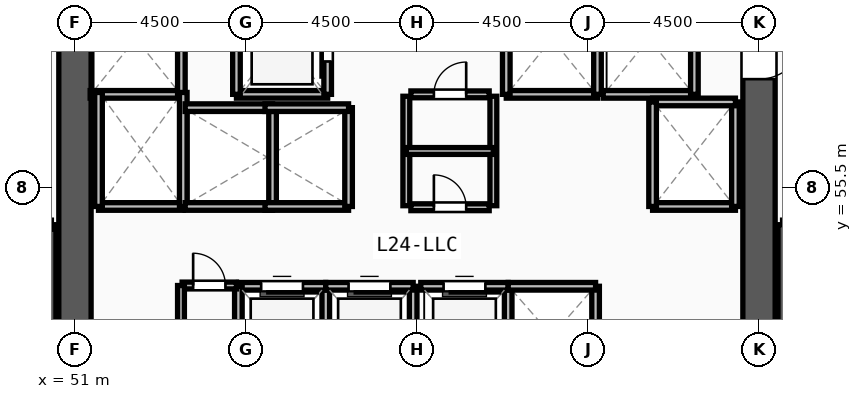
"""IFC4 building model, lengths in metres.
Left out: names, types, materials, properties, quantities, classifications, styles, units other than length and angle.
Written with IfcOpenShell. Run it as: python <this file> out.ifc"""

import sys

from ifc_helpers import new_model, si_unit, direction, frame, frame_2d, origin, place, context, subcontext, project, spatial, rectangle, extrude, source, transform, mapped, element, fill, save


model = new_model("IFC4")
c1 = context("Model", 3, precision=1e-05, world=origin(), true_north=direction((0.0, 1.0)))
c2 = subcontext(c1, "Body", "Model", "MODEL_VIEW")
j1 = project(units=[si_unit("LENGTHUNIT", "METRE"), si_unit("PLANEANGLEUNIT", "RADIAN")], contexts=[c1])
p1 = place(None, origin())
s1 = spatial("IfcSite", under=j1, at=p1, CompositionType="ELEMENT")
p2 = place(p1, origin())
s2 = spatial("IfcBuilding", under=s1, at=p2, CompositionType="ELEMENT")
p3 = place(p2, frame((0.0, 0.0, 93.0)))
s3 = spatial("IfcBuildingStorey", under=s2, at=p3, CompositionType="ELEMENT", Elevation=93.0)
p4 = place(p3, frame((69.0, 60.675, 0.0), z_axis=(0.0, 0.0, 1.0), x_axis=(0.0, -1.0, 0.0)))
e1 = element("IfcWall", 1, at=p4, inside=s3, PredefinedType="SHEAR", context=c2, shape_type="SweptSolid", body=[
    extrude(rectangle(XDim=13.35, YDim=0.85, at=frame_2d((6.675, 0.0))), origin(), (0.0, 0.0, 1.0), 4.22),
])
m1 = source(origin(), c2, "Body", "SweptSolid", [
    extrude(rectangle(XDim=1.2, YDim=2.2, at=frame_2d((0.6, 1.1))), frame((0.0, 0.435, 0.0), z_axis=(0.0, -1.0, 0.0), x_axis=(1.0, 0.0, 0.0)), (0.0, 0.0, 1.0), 0.87),
])
p5 = place(p4, frame((1.125, 0.0, 0.0)))
e2 = element("IfcOpeningElement", 2, at=p5, cuts=e1, PredefinedType="OPENING", context=c2, shape_type="MappedRepresentation", body=[
    mapped(m1, transform((0.0, 0.0, 0.0), x_axis=(1.0, 0.0, 0.0), y_axis=(0.0, 1.0, 0.0), z_axis=(0.0, 0.0, 1.0), scale=1.0)),
])
p6 = place(p3, frame((51.0, 47.325, 0.0), z_axis=(0.0, 0.0, 1.0), x_axis=(0.0, 1.0, 0.0)))
e3 = element("IfcWall", 3, at=p6, inside=s3, PredefinedType="SHEAR", context=c2, shape_type="SweptSolid", body=[
    extrude(rectangle(XDim=13.35, YDim=0.85, at=frame_2d((6.675, 0.0))), origin(), (0.0, 0.0, 1.0), 4.22),
])
for number, where, z_axis, x_axis in (
    (4, (50.38, 46.7, 0.0), (0.0, 0.0, 1.0), (0.0, 1.0, 0.0)),
    (5, (69.62, 54.52, 0.0), (0.0, 0.0, 1.0), (0.0, -1.0, 0.0)),
):
    element("IfcWall", number, at=place(p3, frame(where, z_axis=z_axis, x_axis=x_axis)), inside=s3, PredefinedType="SOLIDWALL", context=c2, shape_type="SweptSolid", body=[
        extrude(rectangle(XDim=7.82, YDim=0.24, at=frame_2d((3.91, 0.0))), origin(), (0.0, 0.0, 1.0), 4.22),
    ])
p7 = place(p3, frame((55.25, 57.95, 0.0), z_axis=(0.0, 0.0, 1.0), x_axis=(1.0, 0.0, 0.0)))
e6 = element("IfcWall", 6, at=p7, inside=s3, PredefinedType="SOLIDWALL", context=c2, shape_type="SweptSolid", body=[
    extrude(rectangle(XDim=2.4, YDim=0.2, at=frame_2d((1.2, 0.0))), origin(), (0.0, 0.0, 1.0), 4.22),
])
p8 = place(p3, frame((57.65, 57.95, 0.0), z_axis=(0.0, 0.0, 1.0), x_axis=(0.0, 1.0, 0.0)))
e7 = element("IfcWall", 7, at=p8, inside=s3, PredefinedType="SOLIDWALL", context=c2, shape_type="SweptSolid", body=[
    extrude(rectangle(XDim=2.93, YDim=0.2, at=frame_2d((1.465, 0.0))), origin(), (0.0, 0.0, 1.0), 4.22),
])
m2 = source(origin(), c2, "Body", "SweptSolid", [
    extrude(rectangle(XDim=1.2, YDim=2.3, at=frame_2d((0.6, 1.15))), frame((0.0, 0.11, 0.0), z_axis=(0.0, -1.0, 0.0), x_axis=(1.0, 0.0, 0.0)), (0.0, 0.0, 1.0), 0.22),
])
p9 = place(p8, frame((0.865, 0.0, 0.0)))
e8 = element("IfcOpeningElement", 8, at=p9, cuts=e7, PredefinedType="OPENING", context=c2, shape_type="MappedRepresentation", body=[
    mapped(m2, transform((0.0, 0.0, 0.0), x_axis=(1.0, 0.0, 0.0), y_axis=(0.0, 1.0, 0.0), z_axis=(0.0, 0.0, 1.0), scale=1.0)),
])
p10 = place(p3, frame((55.25, 60.88, 0.0), z_axis=(0.0, 0.0, 1.0), x_axis=(0.0, -1.0, 0.0)))
e9 = element("IfcWall", 9, at=p10, inside=s3, PredefinedType="SOLIDWALL", context=c2, shape_type="SweptSolid", body=[
    extrude(rectangle(XDim=2.93, YDim=0.2, at=frame_2d((1.465, 0.0))), origin(), (0.0, 0.0, 1.0), 4.22),
])
p11 = place(p3, frame((62.35, 57.95, 0.0), z_axis=(0.0, 0.0, 1.0), x_axis=(1.0, 0.0, 0.0)))
e10 = element("IfcWall", 10, at=p11, inside=s3, PredefinedType="SOLIDWALL", context=c2, shape_type="SweptSolid", body=[
    extrude(rectangle(XDim=2.4, YDim=0.2, at=frame_2d((1.2, 0.0))), origin(), (0.0, 0.0, 1.0), 4.22),
])
for number, where, z_axis, x_axis in (
    (11, (64.75, 57.95, 0.0), (0.0, 0.0, 1.0), (0.0, 1.0, 0.0)),
    (12, (62.35, 60.88, 0.0), (0.0, 0.0, 1.0), (0.0, -1.0, 0.0)),
):
    element("IfcWall", number, at=place(p3, frame(where, z_axis=z_axis, x_axis=x_axis)), inside=s3, PredefinedType="SOLIDWALL", context=c2, shape_type="SweptSolid", body=[
        extrude(rectangle(XDim=2.93, YDim=0.2, at=frame_2d((1.465, 0.0))), origin(), (0.0, 0.0, 1.0), 4.22),
    ])
p12 = place(p3, frame((64.9, 57.95, 0.0), z_axis=(0.0, 0.0, 1.0), x_axis=(1.0, 0.0, 0.0)))
e13 = element("IfcWall", 13, at=p12, inside=s3, PredefinedType="SOLIDWALL", context=c2, shape_type="SweptSolid", body=[
    extrude(rectangle(XDim=2.4, YDim=0.2, at=frame_2d((1.2, 0.0))), origin(), (0.0, 0.0, 1.0), 4.22),
])
p13 = place(p3, frame((67.3, 57.95, 0.0), z_axis=(0.0, 0.0, 1.0), x_axis=(0.0, 1.0, 0.0)))
e14 = element("IfcWall", 14, at=p13, inside=s3, PredefinedType="SOLIDWALL", context=c2, shape_type="SweptSolid", body=[
    extrude(rectangle(XDim=2.93, YDim=0.2, at=frame_2d((1.465, 0.0))), origin(), (0.0, 0.0, 1.0), 4.22),
])
p14 = place(p3, frame((51.4, 57.95, 0.0), z_axis=(0.0, 0.0, 1.0), x_axis=(1.0, 0.0, 0.0)))
e15 = element("IfcWall", 15, at=p14, inside=s3, PredefinedType="SOLIDWALL", context=c2, shape_type="SweptSolid", body=[
    extrude(rectangle(XDim=2.4, YDim=0.2, at=frame_2d((1.2, 0.0))), origin(), (0.0, 0.0, 1.0), 4.22),
])
p15 = place(p3, frame((53.8, 57.95, 0.0), z_axis=(0.0, 0.0, 1.0), x_axis=(0.0, 1.0, 0.0)))
e16 = element("IfcWall", 16, at=p15, inside=s3, PredefinedType="SOLIDWALL", context=c2, shape_type="SweptSolid", body=[
    extrude(rectangle(XDim=2.93, YDim=0.2, at=frame_2d((1.465, 0.0))), origin(), (0.0, 0.0, 1.0), 4.22),
])
p16 = place(p3, frame((51.62, 55.0, 0.0), z_axis=(0.0, 0.0, 1.0), x_axis=(1.0, 0.0, 0.0)))
e17 = element("IfcWall", 17, at=p16, inside=s3, PredefinedType="SOLIDWALL", context=c2, shape_type="SweptSolid", body=[
    extrude(rectangle(XDim=2.23, YDim=0.2, at=frame_2d((1.115, 0.0))), origin(), (0.0, 0.0, 1.0), 4.22),
])
for number, where, z_axis, x_axis in (
    (18, (53.85, 55.0, 0.0), (0.0, 0.0, 1.0), (0.0, 1.0, 0.0)),
    (19, (51.62, 58.0, 0.0), (0.0, 0.0, 1.0), (0.0, -1.0, 0.0)),
):
    element("IfcWall", number, at=place(p3, frame(where, z_axis=z_axis, x_axis=x_axis)), inside=s3, PredefinedType="SOLIDWALL", context=c2, shape_type="SweptSolid", body=[
        extrude(rectangle(XDim=3.0, YDim=0.2, at=frame_2d((1.5, 0.0))), origin(), (0.0, 0.0, 1.0), 4.22),
    ])
p17 = place(p3, frame((66.2, 55.0, 0.0), z_axis=(0.0, 0.0, 1.0), x_axis=(1.0, 0.0, 0.0)))
e20 = element("IfcWall", 20, at=p17, inside=s3, PredefinedType="SOLIDWALL", context=c2, shape_type="SweptSolid", body=[
    extrude(rectangle(XDim=2.18, YDim=0.2, at=frame_2d((1.09, 0.0))), origin(), (0.0, 0.0, 1.0), 4.22),
])
p18 = place(p3, frame((68.38, 55.0, 0.0), z_axis=(0.0, 0.0, 1.0), x_axis=(0.0, 1.0, 0.0)))
e21 = element("IfcWall", 21, at=p18, inside=s3, PredefinedType="SOLIDWALL", context=c2, shape_type="SweptSolid", body=[
    extrude(rectangle(XDim=2.75, YDim=0.2, at=frame_2d((1.375, 0.0))), origin(), (0.0, 0.0, 1.0), 4.22),
])
p19 = place(p3, frame((68.38, 57.75, 0.0), z_axis=(0.0, 0.0, 1.0), x_axis=(-1.0, 0.0, 0.0)))
e22 = element("IfcWall", 22, at=p19, inside=s3, PredefinedType="SOLIDWALL", context=c2, shape_type="SweptSolid", body=[
    extrude(rectangle(XDim=2.18, YDim=0.2, at=frame_2d((1.09, 0.0))), origin(), (0.0, 0.0, 1.0), 4.22),
])
p20 = place(p3, frame((66.2, 57.75, 0.0), z_axis=(0.0, 0.0, 1.0), x_axis=(0.0, -1.0, 0.0)))
e23 = element("IfcWall", 23, at=p20, inside=s3, PredefinedType="SOLIDWALL", context=c2, shape_type="SweptSolid", body=[
    extrude(rectangle(XDim=2.75, YDim=0.2, at=frame_2d((1.375, 0.0))), origin(), (0.0, 0.0, 1.0), 4.22),
])
p21 = place(p3, frame((57.6, 50.3, 0.0), z_axis=(0.0, 0.0, 1.0), x_axis=(0.0, 1.0, 0.0)))
e24 = element("IfcWall", 24, at=p21, inside=s3, PredefinedType="SOLIDWALL", context=c2, shape_type="SweptSolid", body=[
    extrude(rectangle(XDim=2.6, YDim=0.2, at=frame_2d((1.3, 0.0))), origin(), (0.0, 0.0, 1.0), 4.22),
])
p22 = place(p3, frame((57.6, 52.9, 0.0), z_axis=(0.0, 0.0, 1.0), x_axis=(-1.0, 0.0, 0.0)))
e25 = element("IfcWall", 25, at=p22, inside=s3, PredefinedType="SOLIDWALL", context=c2, shape_type="SweptSolid", body=[
    extrude(rectangle(XDim=2.3, YDim=0.2, at=frame_2d((1.15, 0.0))), origin(), (0.0, 0.0, 1.0), 4.22),
])
m3 = source(origin(), c2, "Body", "SweptSolid", [
    extrude(rectangle(XDim=1.1, YDim=2.2, at=frame_2d((0.55, 1.1))), frame((0.0, 0.11, 0.0), z_axis=(0.0, -1.0, 0.0), x_axis=(1.0, 0.0, 0.0)), (0.0, 0.0, 1.0), 0.22),
])
p23 = place(p22, frame((0.6, 0.0, 0.0)))
e26 = element("IfcOpeningElement", 26, at=p23, cuts=e25, PredefinedType="OPENING", context=c2, shape_type="MappedRepresentation", body=[
    mapped(m3, transform((0.0, 0.0, 0.0), x_axis=(1.0, 0.0, 0.0), y_axis=(0.0, 1.0, 0.0), z_axis=(0.0, 0.0, 1.0), scale=1.0)),
])
for number, where, z_axis, x_axis in (
    (27, (55.3, 52.9, 0.0), (0.0, 0.0, 1.0), (0.0, -1.0, 0.0)),
    (28, (59.9, 50.3, 0.0), (0.0, 0.0, 1.0), (0.0, 1.0, 0.0)),
):
    element("IfcWall", number, at=place(p3, frame(where, z_axis=z_axis, x_axis=x_axis)), inside=s3, PredefinedType="SOLIDWALL", context=c2, shape_type="SweptSolid", body=[
        extrude(rectangle(XDim=2.6, YDim=0.2, at=frame_2d((1.3, 0.0))), origin(), (0.0, 0.0, 1.0), 4.22),
    ])
p24 = place(p3, frame((59.9, 52.9, 0.0), z_axis=(0.0, 0.0, 1.0), x_axis=(-1.0, 0.0, 0.0)))
e29 = element("IfcWall", 29, at=p24, inside=s3, PredefinedType="SOLIDWALL", context=c2, shape_type="SweptSolid", body=[
    extrude(rectangle(XDim=2.3, YDim=0.2, at=frame_2d((1.15, 0.0))), origin(), (0.0, 0.0, 1.0), 4.22),
])
p25 = place(p24, frame((0.6, 0.0, 0.0)))
e30 = element("IfcOpeningElement", 30, at=p25, cuts=e29, PredefinedType="OPENING", context=c2, shape_type="MappedRepresentation", body=[
    mapped(m3, transform((0.0, 0.0, 0.0), x_axis=(1.0, 0.0, 0.0), y_axis=(0.0, 1.0, 0.0), z_axis=(0.0, 0.0, 1.0), scale=1.0)),
])
p26 = place(p3, frame((62.4, 50.3, 0.0), z_axis=(0.0, 0.0, 1.0), x_axis=(0.0, 1.0, 0.0)))
e31 = element("IfcWall", 31, at=p26, inside=s3, PredefinedType="SOLIDWALL", context=c2, shape_type="SweptSolid", body=[
    extrude(rectangle(XDim=2.6, YDim=0.2, at=frame_2d((1.3, 0.0))), origin(), (0.0, 0.0, 1.0), 4.22),
])
p27 = place(p3, frame((62.4, 52.9, 0.0), z_axis=(0.0, 0.0, 1.0), x_axis=(-1.0, 0.0, 0.0)))
e32 = element("IfcWall", 32, at=p27, inside=s3, PredefinedType="SOLIDWALL", context=c2, shape_type="SweptSolid", body=[
    extrude(rectangle(XDim=2.3, YDim=0.2, at=frame_2d((1.15, 0.0))), origin(), (0.0, 0.0, 1.0), 4.22),
])
p28 = place(p27, frame((0.6, 0.0, 0.0)))
e33 = element("IfcOpeningElement", 33, at=p28, cuts=e32, PredefinedType="OPENING", context=c2, shape_type="MappedRepresentation", body=[
    mapped(m3, transform((0.0, 0.0, 0.0), x_axis=(1.0, 0.0, 0.0), y_axis=(0.0, 1.0, 0.0), z_axis=(0.0, 0.0, 1.0), scale=1.0)),
])
p29 = place(p3, frame((64.7, 50.3, 0.0), z_axis=(0.0, 0.0, 1.0), x_axis=(0.0, 1.0, 0.0)))
e34 = element("IfcWall", 34, at=p29, inside=s3, PredefinedType="SOLIDWALL", context=c2, shape_type="SweptSolid", body=[
    extrude(rectangle(XDim=2.6, YDim=0.2, at=frame_2d((1.3, 0.0))), origin(), (0.0, 0.0, 1.0), 4.22),
])
for number, where, z_axis, x_axis in (
    (35, (64.7, 52.9, 0.0), (0.0, 0.0, 1.0), (-1.0, 0.0, 0.0)),
    (36, (53.9, 55.0, 0.0), (0.0, 0.0, 1.0), (1.0, 0.0, 0.0)),
):
    element("IfcWall", number, at=place(p3, frame(where, z_axis=z_axis, x_axis=x_axis)), inside=s3, PredefinedType="SOLIDWALL", context=c2, shape_type="SweptSolid", body=[
        extrude(rectangle(XDim=2.3, YDim=0.2, at=frame_2d((1.15, 0.0))), origin(), (0.0, 0.0, 1.0), 4.22),
    ])
p30 = place(p3, frame((56.2, 55.0, 0.0), z_axis=(0.0, 0.0, 1.0), x_axis=(0.0, 1.0, 0.0)))
e37 = element("IfcWall", 37, at=p30, inside=s3, PredefinedType="SOLIDWALL", context=c2, shape_type="SweptSolid", body=[
    extrude(rectangle(XDim=2.6, YDim=0.2, at=frame_2d((1.3, 0.0))), origin(), (0.0, 0.0, 1.0), 4.22),
])
p31 = place(p3, frame((56.2, 57.6, 0.0), z_axis=(0.0, 0.0, 1.0), x_axis=(-1.0, 0.0, 0.0)))
e38 = element("IfcWall", 38, at=p31, inside=s3, PredefinedType="SOLIDWALL", context=c2, shape_type="SweptSolid", body=[
    extrude(rectangle(XDim=2.3, YDim=0.2, at=frame_2d((1.15, 0.0))), origin(), (0.0, 0.0, 1.0), 4.22),
])
p32 = place(p3, frame((56.0, 55.0, 0.0), z_axis=(0.0, 0.0, 1.0), x_axis=(1.0, 0.0, 0.0)))
e39 = element("IfcWall", 39, at=p32, inside=s3, PredefinedType="SOLIDWALL", context=c2, shape_type="SweptSolid", body=[
    extrude(rectangle(XDim=2.2, YDim=0.2, at=frame_2d((1.1, 0.0))), origin(), (0.0, 0.0, 1.0), 4.22),
])
p33 = place(p3, frame((58.2, 55.0, 0.0), z_axis=(0.0, 0.0, 1.0), x_axis=(0.0, 1.0, 0.0)))
e40 = element("IfcWall", 40, at=p33, inside=s3, PredefinedType="SOLIDWALL", context=c2, shape_type="SweptSolid", body=[
    extrude(rectangle(XDim=2.6, YDim=0.2, at=frame_2d((1.3, 0.0))), origin(), (0.0, 0.0, 1.0), 4.22),
])
p34 = place(p3, frame((58.2, 57.6, 0.0), z_axis=(0.0, 0.0, 1.0), x_axis=(-1.0, 0.0, 0.0)))
e41 = element("IfcWall", 41, at=p34, inside=s3, PredefinedType="SOLIDWALL", context=c2, shape_type="SweptSolid", body=[
    extrude(rectangle(XDim=2.2, YDim=0.2, at=frame_2d((1.1, 0.0))), origin(), (0.0, 0.0, 1.0), 4.22),
])
p35 = place(p3, frame((59.84, 54.98, 0.0), z_axis=(0.0, 0.0, 1.0), x_axis=(1.0, 0.0, 0.0)))
e42 = element("IfcWall", 42, at=p35, inside=s3, PredefinedType="PARTITIONING", context=c2, shape_type="SweptSolid", body=[
    extrude(rectangle(XDim=2.06, YDim=0.18, at=frame_2d((1.03, 0.0))), origin(), (0.0, 0.0, 1.0), 4.22),
])
m4 = source(origin(), c2, "Body", "SweptSolid", [
    extrude(rectangle(XDim=0.85, YDim=2.1, at=frame_2d((0.425, 1.05))), frame((0.0, 0.1, 0.0), z_axis=(0.0, -1.0, 0.0), x_axis=(1.0, 0.0, 0.0)), (0.0, 0.0, 1.0), 0.2),
])
p36 = place(p35, frame((0.605, 0.0, 0.0)))
e43 = element("IfcOpeningElement", 43, at=p36, cuts=e42, PredefinedType="OPENING", context=c2, shape_type="MappedRepresentation", body=[
    mapped(m4, transform((0.0, 0.0, 0.0), x_axis=(1.0, 0.0, 0.0), y_axis=(0.0, 1.0, 0.0), z_axis=(0.0, 0.0, 1.0), scale=1.0)),
])
p37 = place(p3, frame((59.84, 57.95, 0.0), z_axis=(0.0, 0.0, 1.0), x_axis=(1.0, 0.0, 0.0)))
e44 = element("IfcWall", 44, at=p37, inside=s3, PredefinedType="PARTITIONING", context=c2, shape_type="SweptSolid", body=[
    extrude(rectangle(XDim=2.06, YDim=0.18, at=frame_2d((1.03, 0.0))), origin(), (0.0, 0.0, 1.0), 4.22),
])
p38 = place(p37, frame((0.605, 0.0, 0.0)))
e45 = element("IfcOpeningElement", 45, at=p38, cuts=e44, PredefinedType="OPENING", context=c2, shape_type="MappedRepresentation", body=[
    mapped(m4, transform((0.0, 0.0, 0.0), x_axis=(1.0, 0.0, 0.0), y_axis=(0.0, 1.0, 0.0), z_axis=(0.0, 0.0, 1.0), scale=1.0)),
])
p39 = place(p3, frame((53.82, 52.92, 0.0), z_axis=(0.0, 0.0, 1.0), x_axis=(1.0, 0.0, 0.0)))
e46 = element("IfcWall", 46, at=p39, inside=s3, PredefinedType="PARTITIONING", context=c2, shape_type="SweptSolid", body=[
    extrude(rectangle(XDim=1.43, YDim=0.18, at=frame_2d((0.715, 0.0))), origin(), (0.0, 0.0, 1.0), 4.22),
])
p40 = place(p39, frame((0.29, 0.0, 0.0)))
e47 = element("IfcOpeningElement", 47, at=p40, cuts=e46, PredefinedType="OPENING", context=c2, shape_type="MappedRepresentation", body=[
    mapped(m4, transform((0.0, 0.0, 0.0), x_axis=(1.0, 0.0, 0.0), y_axis=(0.0, 1.0, 0.0), z_axis=(0.0, 0.0, 1.0), scale=1.0)),
])
for number, where, z_axis, x_axis in (
    (48, (59.72, 55.02, 0.0), (0.0, 0.0, 1.0), (0.0, 1.0, 0.0)),
    (49, (62.01, 55.02, 0.0), (0.0, 0.0, 1.0), (0.0, 1.0, 0.0)),
):
    element("IfcWall", number, at=place(p3, frame(where, z_axis=z_axis, x_axis=x_axis)), inside=s3, PredefinedType="PARTITIONING", context=c2, shape_type="SweptSolid", body=[
        extrude(rectangle(XDim=2.88, YDim=0.18, at=frame_2d((1.44, 0.0))), origin(), (0.0, 0.0, 1.0), 4.22),
    ])
p41 = place(p3, frame((59.72, 56.46, 0.0), z_axis=(0.0, 0.0, 1.0), x_axis=(1.0, 0.0, 0.0)))
e50 = element("IfcWall", 50, at=p41, inside=s3, PredefinedType="PARTITIONING", context=c2, shape_type="SweptSolid", body=[
    extrude(rectangle(XDim=2.29, YDim=0.18, at=frame_2d((1.145, 0.0))), origin(), (0.0, 0.0, 1.0), 4.22),
])
p42 = place(p3, frame((53.79, 50.35, 0.0), z_axis=(0.0, 0.0, 1.0), x_axis=(0.0, 1.0, 0.0)))
e51 = element("IfcWall", 51, at=p42, inside=s3, PredefinedType="PARTITIONING", context=c2, shape_type="SweptSolid", body=[
    extrude(rectangle(XDim=2.57, YDim=0.18, at=frame_2d((1.285, 0.0))), origin(), (0.0, 0.0, 1.0), 4.22),
])
m5 = source(origin(), c2, "Body", "SweptSolid", [
    extrude(rectangle(XDim=1.2, YDim=2.2, at=frame_2d((0.6, 1.1))), frame((0.0, 0.025, 0.0), z_axis=(0.0, -1.0, 0.0), x_axis=(1.0, 0.0, 0.0)), (0.0, 0.0, 1.0), 0.05),
])
p43 = place(p5, origin())
e52 = element("IfcDoor", 52, at=p43, inside=s3, OperationType="SINGLE_SWING_LEFT", PredefinedType="DOOR", context=c2, shape_type="MappedRepresentation", body=[
    mapped(m5, transform((0.0, 0.0, 0.0), x_axis=(1.0, 0.0, 0.0), y_axis=(0.0, 1.0, 0.0), z_axis=(0.0, 0.0, 1.0), scale=1.0)),
])
fill(e2, e52)
m6 = source(origin(), c2, "Body", "SweptSolid", [
    extrude(rectangle(XDim=1.2, YDim=2.3, at=frame_2d((0.6, 1.15))), frame((0.0, 0.025, 0.0), z_axis=(0.0, -1.0, 0.0), x_axis=(1.0, 0.0, 0.0)), (0.0, 0.0, 1.0), 0.05),
])
p44 = place(p9, origin())
e53 = element("IfcDoor", 53, at=p44, inside=s3, OperationType="SLIDING_TO_LEFT", PredefinedType="DOOR", context=c2, shape_type="MappedRepresentation", body=[
    mapped(m6, transform((0.0, 0.0, 0.0), x_axis=(1.0, 0.0, 0.0), y_axis=(0.0, 1.0, 0.0), z_axis=(0.0, 0.0, 1.0), scale=1.0)),
])
fill(e8, e53)
m7 = source(origin(), c2, "Body", "SweptSolid", [
    extrude(rectangle(XDim=1.1, YDim=2.2, at=frame_2d((0.55, 1.1))), frame((0.0, 0.025, 0.0), z_axis=(0.0, -1.0, 0.0), x_axis=(1.0, 0.0, 0.0)), (0.0, 0.0, 1.0), 0.05),
])
p45 = place(p23, origin())
e54 = element("IfcDoor", 54, at=p45, inside=s3, OperationType="SLIDING_TO_LEFT", PredefinedType="DOOR", context=c2, shape_type="MappedRepresentation", body=[
    mapped(m7, transform((0.0, 0.0, 0.0), x_axis=(1.0, 0.0, 0.0), y_axis=(0.0, 1.0, 0.0), z_axis=(0.0, 0.0, 1.0), scale=1.0)),
])
fill(e26, e54)
p46 = place(p25, origin())
e55 = element("IfcDoor", 55, at=p46, inside=s3, OperationType="SLIDING_TO_LEFT", PredefinedType="DOOR", context=c2, shape_type="MappedRepresentation", body=[
    mapped(m7, transform((0.0, 0.0, 0.0), x_axis=(1.0, 0.0, 0.0), y_axis=(0.0, 1.0, 0.0), z_axis=(0.0, 0.0, 1.0), scale=1.0)),
])
fill(e30, e55)
p47 = place(p28, origin())
e56 = element("IfcDoor", 56, at=p47, inside=s3, OperationType="SLIDING_TO_LEFT", PredefinedType="DOOR", context=c2, shape_type="MappedRepresentation", body=[
    mapped(m7, transform((0.0, 0.0, 0.0), x_axis=(1.0, 0.0, 0.0), y_axis=(0.0, 1.0, 0.0), z_axis=(0.0, 0.0, 1.0), scale=1.0)),
])
fill(e33, e56)
m8 = source(origin(), c2, "Body", "SweptSolid", [
    extrude(rectangle(XDim=0.85, YDim=2.1, at=frame_2d((0.425, 1.05))), frame((0.0, 0.025, 0.0), z_axis=(0.0, -1.0, 0.0), x_axis=(1.0, 0.0, 0.0)), (0.0, 0.0, 1.0), 0.05),
])
p48 = place(p36, origin())
e57 = element("IfcDoor", 57, at=p48, inside=s3, OperationType="SINGLE_SWING_LEFT", PredefinedType="DOOR", context=c2, shape_type="MappedRepresentation", body=[
    mapped(m8, transform((0.0, 0.0, 0.0), x_axis=(1.0, 0.0, 0.0), y_axis=(0.0, 1.0, 0.0), z_axis=(0.0, 0.0, 1.0), scale=1.0)),
])
fill(e43, e57)
p49 = place(p38, origin())
e58 = element("IfcDoor", 58, at=p49, inside=s3, OperationType="SINGLE_SWING_RIGHT", PredefinedType="DOOR", context=c2, shape_type="MappedRepresentation", body=[
    mapped(m8, transform((0.0, 0.0, 0.0), x_axis=(1.0, 0.0, 0.0), y_axis=(0.0, 1.0, 0.0), z_axis=(0.0, 0.0, 1.0), scale=1.0)),
])
fill(e45, e58)
p50 = place(p40, origin())
e59 = element("IfcDoor", 59, at=p50, inside=s3, OperationType="SINGLE_SWING_LEFT", PredefinedType="DOOR", context=c2, shape_type="MappedRepresentation", body=[
    mapped(m8, transform((0.0, 0.0, 0.0), x_axis=(1.0, 0.0, 0.0), y_axis=(0.0, 1.0, 0.0), z_axis=(0.0, 0.0, 1.0), scale=1.0)),
])
fill(e47, e59)
save(model, sys.argv[1])
